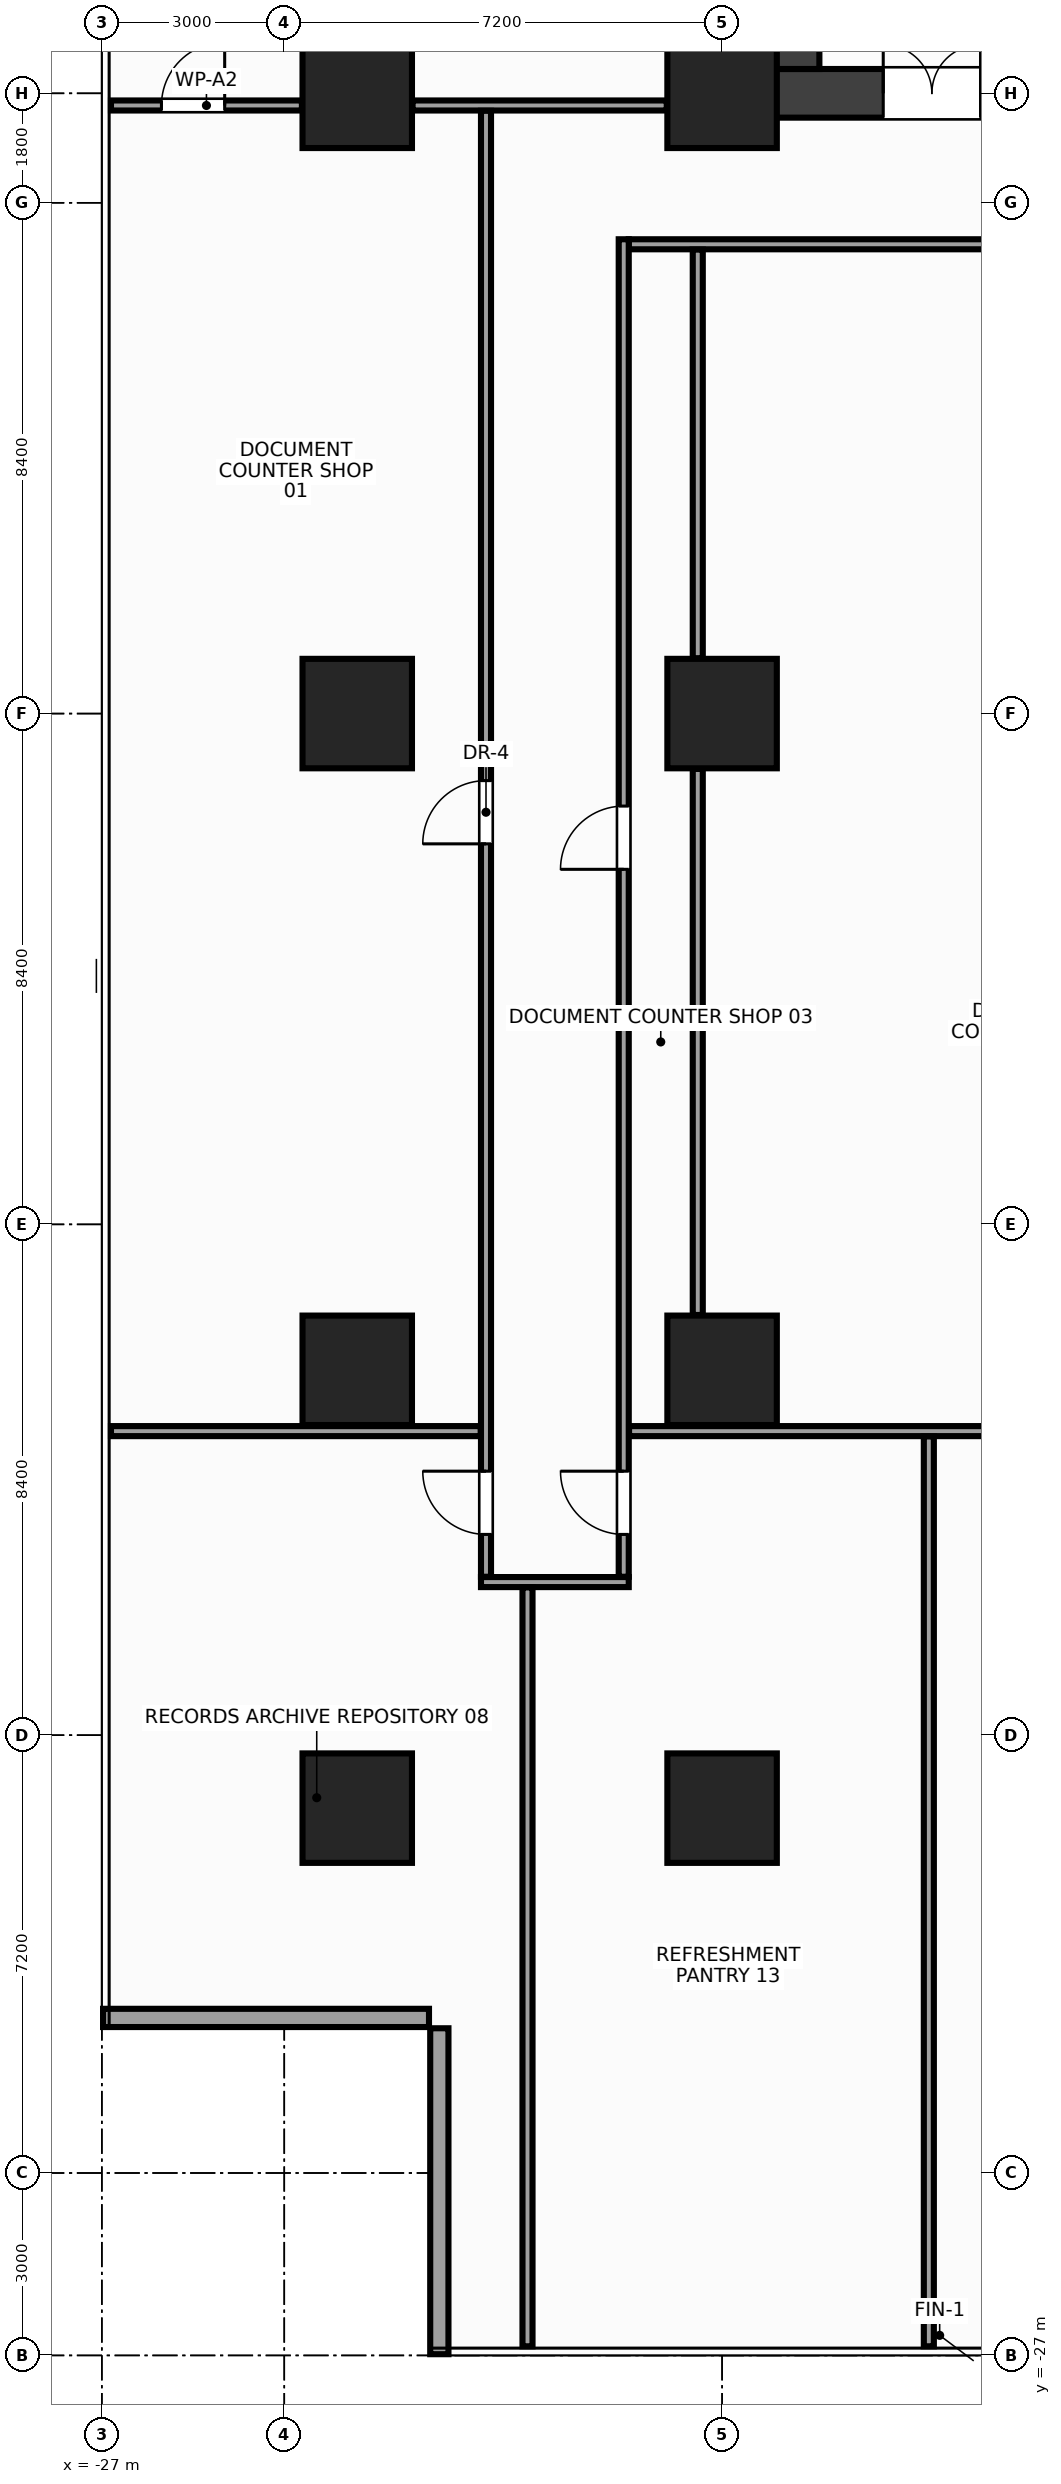
"""IFC4 building model, lengths in metres.
Left out: names, types, materials, properties, quantities, classifications, styles, units other than length and angle.
Written with IfcOpenShell. Run it as: python <this file> out.ifc"""

import sys

from ifc_helpers import new_model, si_unit, direction, frame, frame_2d, origin, origin_2d, place, context, subcontext, project, spatial, rectangle, extrude, source, transform, mapped, element, fill, save


model = new_model("IFC4")
c1 = context("Model", 3, precision=1e-05, world=origin(), true_north=direction((0.0, 1.0)))
c2 = subcontext(c1, "Body", "Model", "MODEL_VIEW")
j1 = project(units=[si_unit("LENGTHUNIT", "METRE"), si_unit("PLANEANGLEUNIT", "RADIAN")], contexts=[c1])
p1 = place(None, origin())
s1 = spatial("IfcSite", under=j1, at=p1, CompositionType="ELEMENT")
p2 = place(p1, origin())
s2 = spatial("IfcBuilding", under=s1, at=p2, CompositionType="ELEMENT")
p3 = place(p2, frame((0.0, 0.0, 59.6)))
s3 = spatial("IfcBuildingStorey", under=s2, at=p3, CompositionType="ELEMENT", Elevation=59.6)
m1 = source(origin(), c2, "Body", "SweptSolid", [
    extrude(rectangle(XDim=32.0, YDim=0.8, at=frame_2d((16.0, 0.0))), origin(), (0.0, 0.0, 1.0), 3.6),
])
p4 = place(p3, frame((-16.0, 10.2, 0.0), z_axis=(0.0, 0.0, 1.0), x_axis=(1.0, 0.0, 0.0)))
e1 = element("IfcWall", 1, at=p4, inside=s3, PredefinedType="SHEAR", context=c2, shape_type="MappedRepresentation", body=[
    mapped(m1, transform((0.0, 0.0, 0.0), x_axis=(1.0, 0.0, 0.0), y_axis=(0.0, 1.0, 0.0), z_axis=(0.0, 0.0, 1.0), scale=1.0)),
])
p5 = place(p4, frame((1.85, 0.0, 0.0)))
e2 = element("IfcOpeningElement", 2, at=p5, cuts=e1, PredefinedType="OPENING", context=c2, shape_type="SweptSolid", body=[
    extrude(rectangle(XDim=1.6, YDim=2.15, at=frame_2d((0.8, 1.075))), frame((0.0, 0.412, 0.0), z_axis=(0.0, -1.0, 0.0), x_axis=(1.0, 0.0, 0.0)), (0.0, 0.0, 1.0), 0.824),
])
p6 = place(p4, frame((28.55, 0.0, 0.0)))
e3 = element("IfcOpeningElement", 3, at=p6, cuts=e1, PredefinedType="OPENING", context=c2, shape_type="SweptSolid", body=[
    extrude(rectangle(XDim=1.6, YDim=2.15, at=frame_2d((0.8, 1.075))), frame((0.0, 0.412, 0.0), z_axis=(0.0, -1.0, 0.0), x_axis=(1.0, 0.0, 0.0)), (0.0, 0.0, 1.0), 0.824),
])
p7 = place(p4, frame((15.25, 0.0, 0.0)))
e4 = element("IfcOpeningElement", 4, at=p7, cuts=e1, PredefinedType="OPENING", context=c2, shape_type="SweptSolid", body=[
    extrude(rectangle(XDim=1.5, YDim=2.2, at=frame_2d((0.75, 1.1))), frame((0.0, 0.412, 0.0), z_axis=(0.0, -1.0, 0.0), x_axis=(1.0, 0.0, 0.0)), (0.0, 0.0, 1.0), 0.824),
])
m2 = source(origin(), c2, "Body", "SweptSolid", [
    extrude(rectangle(XDim=12.8, YDim=0.8, at=frame_2d((6.4, 0.0))), origin(), (0.0, 0.0, 1.0), 3.6),
])
p8 = place(p3, frame((-15.6, 10.6, 0.0), z_axis=(0.0, 0.0, 1.0), x_axis=(0.0, 1.0, 0.0)))
e5 = element("IfcWall", 5, at=p8, inside=s3, PredefinedType="SHEAR", context=c2, shape_type="MappedRepresentation", body=[
    mapped(m2, transform((0.0, 0.0, 0.0), x_axis=(1.0, 0.0, 0.0), y_axis=(0.0, 1.0, 0.0), z_axis=(0.0, 0.0, 1.0), scale=1.0)),
])
m3 = source(origin(), c2, "Body", "SweptSolid", [
    extrude(rectangle(XDim=1.8, YDim=1.8, at=origin_2d()), origin(), (0.0, 0.0, 1.0), 3.6),
])
for number, where, z_axis, x_axis in (
    (6, (-16.8, -18.0, 0.0), (0.0, 0.0, 1.0), (1.0, 0.0, 0.0)),
    (7, (-16.8, -10.8, 0.0), (0.0, 0.0, 1.0), (1.0, 0.0, 0.0)),
    (8, (-16.8, 0.0, 0.0), (0.0, 0.0, 1.0), (1.0, 0.0, 0.0)),
    (9, (-16.8, 10.2, 0.0), (0.0, 0.0, 1.0), (1.0, 0.0, 0.0)),
    (10, (-22.8, -18.0, 0.0), (0.0, 0.0, 1.0), (1.0, 0.0, 0.0)),
    (11, (-22.8, -10.8, 0.0), (0.0, 0.0, 1.0), (1.0, 0.0, 0.0)),
    (12, (-22.8, 0.0, 0.0), (0.0, 0.0, 1.0), (1.0, 0.0, 0.0)),
    (13, (-22.8, 10.2, 0.0), (0.0, 0.0, 1.0), (1.0, 0.0, 0.0)),
):
    element("IfcColumn", number, at=place(p3, frame(where, z_axis=z_axis, x_axis=x_axis)), inside=s3, PredefinedType="COLUMN", context=c2, shape_type="MappedRepresentation", body=[
        mapped(m3, transform((0.0, 0.0, 0.0), x_axis=(1.0, 0.0, 0.0), y_axis=(0.0, 1.0, 0.0), z_axis=(0.0, 0.0, 1.0), scale=1.0)),
    ])
m4 = source(origin(), c2, "Body", "SweptSolid", [
    extrude(rectangle(XDim=5.36, YDim=0.3, at=frame_2d((2.68, 0.0))), origin(), (0.0, 0.0, 1.0), 2.74),
])
for number, where, z_axis, x_axis in (
    (14, (-26.98, -21.45, 0.0), (0.0, 0.0, 1.0), (1.0, 0.0, 0.0)),
    (15, (-21.45, -21.62, 0.0), (0.0, 0.0, 1.0), (0.0, -1.0, 0.0)),
):
    element("IfcWall", number, at=place(p3, frame(where, z_axis=z_axis, x_axis=x_axis)), inside=s3, PredefinedType="STANDARD", context=c2, shape_type="MappedRepresentation", body=[
        mapped(m4, transform((0.0, 0.0, 0.0), x_axis=(1.0, 0.0, 0.0), y_axis=(0.0, 1.0, 0.0), z_axis=(0.0, 0.0, 1.0), scale=1.0)),
    ])
m5 = source(origin(), c2, "Body", "SweptSolid", [
    extrude(rectangle(XDim=3.14, YDim=0.165, at=frame_2d((1.57, 0.0))), origin(), (0.0, 0.0, 1.0), 2.435),
])
p9 = place(p3, frame((-26.85, 10.0, 0.0), z_axis=(0.0, 0.0, 1.0), x_axis=(1.0, 0.0, 0.0)))
e16 = element("IfcWall", 16, at=p9, inside=s3, PredefinedType="PARTITIONING", context=c2, shape_type="MappedRepresentation", body=[
    mapped(m5, transform((0.0, 0.0, 0.0), x_axis=(1.0, 0.0, 0.0), y_axis=(0.0, 1.0, 0.0), z_axis=(0.0, 0.0, 1.0), scale=1.0)),
])
p10 = place(p9, frame((0.83, 0.0, 0.0)))
e17 = element("IfcOpeningElement", 17, at=p10, cuts=e16, PredefinedType="OPENING", context=c2, shape_type="SweptSolid", body=[
    extrude(rectangle(XDim=1.04, YDim=2.2, at=frame_2d((0.52, 1.1))), frame((0.0, 0.094, 0.0), z_axis=(0.0, -1.0, 0.0), x_axis=(1.0, 0.0, 0.0)), (0.0, 0.0, 1.0), 0.189),
])
m6 = source(origin(), c2, "Body", "SweptSolid", [
    extrude(rectangle(XDim=4.18, YDim=0.165, at=frame_2d((2.09, 0.0))), origin(), (0.0, 0.0, 1.0), 2.745),
])
p11 = place(p3, frame((-21.89, 10.0, 0.0), z_axis=(0.0, 0.0, 1.0), x_axis=(1.0, 0.0, 0.0)))
e18 = element("IfcWall", 18, at=p11, inside=s3, PredefinedType="PARTITIONING", context=c2, shape_type="MappedRepresentation", body=[
    mapped(m6, transform((0.0, 0.0, 0.0), x_axis=(1.0, 0.0, 0.0), y_axis=(0.0, 1.0, 0.0), z_axis=(0.0, 0.0, 1.0), scale=1.0)),
])
m7 = source(origin(), c2, "Body", "SweptSolid", [
    extrude(rectangle(XDim=36.67, YDim=0.165, at=frame_2d((18.335, 0.0))), origin(), (0.0, 0.0, 1.0), 2.745),
])
p12 = place(p3, frame((-18.335, 7.718, 0.0), z_axis=(0.0, 0.0, 1.0), x_axis=(1.0, 0.0, 0.0)))
e19 = element("IfcWall", 19, at=p12, inside=s3, PredefinedType="PARTITIONING", context=c2, shape_type="MappedRepresentation", body=[
    mapped(m7, transform((0.0, 0.0, 0.0), x_axis=(1.0, 0.0, 0.0), y_axis=(0.0, 1.0, 0.0), z_axis=(0.0, 0.0, 1.0), scale=1.0)),
])
p13 = place(p12, frame((6.015, 0.0, 0.0)))
e20 = element("IfcOpeningElement", 20, at=p13, cuts=e19, PredefinedType="OPENING", context=c2, shape_type="SweptSolid", body=[
    extrude(rectangle(XDim=1.04, YDim=2.2, at=frame_2d((0.52, 1.1))), frame((0.0, 0.094, 0.0), z_axis=(0.0, -1.0, 0.0), x_axis=(1.0, 0.0, 0.0)), (0.0, 0.0, 1.0), 0.189),
])
p14 = place(p12, frame((29.615, 0.0, 0.0)))
e21 = element("IfcOpeningElement", 21, at=p14, cuts=e19, PredefinedType="OPENING", context=c2, shape_type="SweptSolid", body=[
    extrude(rectangle(XDim=1.04, YDim=2.2, at=frame_2d((0.52, 1.1))), frame((0.0, 0.094, 0.0), z_axis=(0.0, -1.0, 0.0), x_axis=(1.0, 0.0, 0.0)), (0.0, 0.0, 1.0), 0.189),
])
p15 = place(p12, frame((17.815, 0.0, 0.0)))
e22 = element("IfcOpeningElement", 22, at=p15, cuts=e19, PredefinedType="OPENING", context=c2, shape_type="SweptSolid", body=[
    extrude(rectangle(XDim=1.04, YDim=2.2, at=frame_2d((0.52, 1.1))), frame((0.0, 0.094, 0.0), z_axis=(0.0, -1.0, 0.0), x_axis=(1.0, 0.0, 0.0)), (0.0, 0.0, 1.0), 0.189),
])
m8 = source(origin(), c2, "Body", "SweptSolid", [
    extrude(rectangle(XDim=2.43, YDim=0.165, at=frame_2d((1.215, 0.0))), origin(), (0.0, 0.0, 1.0), 2.745),
])
p16 = place(p3, frame((-20.765, -14.282, 0.0), z_axis=(0.0, 0.0, 1.0), x_axis=(1.0, 0.0, 0.0)))
e23 = element("IfcWall", 23, at=p16, inside=s3, PredefinedType="PARTITIONING", context=c2, shape_type="MappedRepresentation", body=[
    mapped(m8, transform((0.0, 0.0, 0.0), x_axis=(1.0, 0.0, 0.0), y_axis=(0.0, 1.0, 0.0), z_axis=(0.0, 0.0, 1.0), scale=1.0)),
])
m9 = source(origin(), c2, "Body", "SweptSolid", [
    extrude(rectangle(XDim=24.108, YDim=0.165, at=frame_2d((12.054, 0.0))), origin(), (0.0, 0.0, 1.0), 2.745),
])
p17 = place(p3, frame((-20.683, -14.195, 0.0), z_axis=(0.0, 0.0, 1.0), x_axis=(0.0, 1.0, 0.0)))
e24 = element("IfcWall", 24, at=p17, inside=s3, PredefinedType="PARTITIONING", context=c2, shape_type="MappedRepresentation", body=[
    mapped(m9, transform((0.0, 0.0, 0.0), x_axis=(1.0, 0.0, 0.0), y_axis=(0.0, 1.0, 0.0), z_axis=(0.0, 0.0, 1.0), scale=1.0)),
])
p18 = place(p17, frame((12.052, 0.0, 0.0)))
e25 = element("IfcOpeningElement", 25, at=p18, cuts=e24, PredefinedType="OPENING", context=c2, shape_type="SweptSolid", body=[
    extrude(rectangle(XDim=1.04, YDim=2.2, at=frame_2d((0.52, 1.1))), frame((0.0, 0.094, 0.0), z_axis=(0.0, -1.0, 0.0), x_axis=(1.0, 0.0, 0.0)), (0.0, 0.0, 1.0), 0.189),
])
p19 = place(p17, frame((0.696, 0.0, 0.0)))
e26 = element("IfcOpeningElement", 26, at=p19, cuts=e24, PredefinedType="OPENING", context=c2, shape_type="SweptSolid", body=[
    extrude(rectangle(XDim=1.04, YDim=2.2, at=frame_2d((0.52, 1.1))), frame((0.0, 0.094, 0.0), z_axis=(0.0, -1.0, 0.0), x_axis=(1.0, 0.0, 0.0)), (0.0, 0.0, 1.0), 0.189),
])
m10 = source(origin(), c2, "Body", "SweptSolid", [
    extrude(rectangle(XDim=21.995, YDim=0.165, at=frame_2d((10.998, 0.0))), origin(), (0.0, 0.0, 1.0), 2.745),
])
p20 = place(p3, frame((-18.417, -14.195, 0.0), z_axis=(0.0, 0.0, 1.0), x_axis=(0.0, 1.0, 0.0)))
e27 = element("IfcWall", 27, at=p20, inside=s3, PredefinedType="PARTITIONING", context=c2, shape_type="MappedRepresentation", body=[
    mapped(m10, transform((0.0, 0.0, 0.0), x_axis=(1.0, 0.0, 0.0), y_axis=(0.0, 1.0, 0.0), z_axis=(0.0, 0.0, 1.0), scale=1.0)),
])
p21 = place(p20, frame((11.634, 0.0, 0.0)))
e28 = element("IfcOpeningElement", 28, at=p21, cuts=e27, PredefinedType="OPENING", context=c2, shape_type="SweptSolid", body=[
    extrude(rectangle(XDim=1.04, YDim=2.2, at=frame_2d((0.52, 1.1))), frame((0.0, 0.094, 0.0), z_axis=(0.0, -1.0, 0.0), x_axis=(1.0, 0.0, 0.0)), (0.0, 0.0, 1.0), 0.189),
])
p22 = place(p20, frame((0.696, 0.0, 0.0)))
e29 = element("IfcOpeningElement", 29, at=p22, cuts=e27, PredefinedType="OPENING", context=c2, shape_type="SweptSolid", body=[
    extrude(rectangle(XDim=1.04, YDim=2.2, at=frame_2d((0.52, 1.1))), frame((0.0, 0.094, 0.0), z_axis=(0.0, -1.0, 0.0), x_axis=(1.0, 0.0, 0.0)), (0.0, 0.0, 1.0), 0.189),
])
m11 = source(origin(), c2, "Body", "SweptSolid", [
    extrude(rectangle(XDim=6.08, YDim=0.165, at=frame_2d((3.04, 0.0))), origin(), (0.0, 0.0, 1.0), 2.945),
])
p23 = place(p3, frame((-26.85, -11.8, 0.0), z_axis=(0.0, 0.0, 1.0), x_axis=(1.0, 0.0, 0.0)))
e30 = element("IfcWall", 30, at=p23, inside=s3, PredefinedType="PARTITIONING", context=c2, shape_type="MappedRepresentation", body=[
    mapped(m11, transform((0.0, 0.0, 0.0), x_axis=(1.0, 0.0, 0.0), y_axis=(0.0, 1.0, 0.0), z_axis=(0.0, 0.0, 1.0), scale=1.0)),
])
m12 = source(origin(), c2, "Body", "SweptSolid", [
    extrude(rectangle(XDim=36.66, YDim=0.165, at=frame_2d((18.33, 0.0))), origin(), (0.0, 0.0, 1.0), 2.945),
])
p24 = place(p3, frame((-18.33, -11.8, 0.0), z_axis=(0.0, 0.0, 1.0), x_axis=(1.0, 0.0, 0.0)))
e31 = element("IfcWall", 31, at=p24, inside=s3, PredefinedType="PARTITIONING", context=c2, shape_type="MappedRepresentation", body=[
    mapped(m12, transform((0.0, 0.0, 0.0), x_axis=(1.0, 0.0, 0.0), y_axis=(0.0, 1.0, 0.0), z_axis=(0.0, 0.0, 1.0), scale=1.0)),
])
p25 = place(p24, frame((7.47, 0.0, 0.0)))
e32 = element("IfcOpeningElement", 32, at=p25, cuts=e31, PredefinedType="OPENING", context=c2, shape_type="SweptSolid", body=[
    extrude(rectangle(XDim=1.04, YDim=2.2, at=frame_2d((0.52, 1.1))), frame((0.0, 0.094, 0.0), z_axis=(0.0, -1.0, 0.0), x_axis=(1.0, 0.0, 0.0)), (0.0, 0.0, 1.0), 0.189),
])
p26 = place(p24, frame((15.83, 0.0, 0.0)))
e33 = element("IfcOpeningElement", 33, at=p26, cuts=e31, PredefinedType="OPENING", context=c2, shape_type="SweptSolid", body=[
    extrude(rectangle(XDim=1.04, YDim=2.2, at=frame_2d((0.52, 1.1))), frame((0.0, 0.094, 0.0), z_axis=(0.0, -1.0, 0.0), x_axis=(1.0, 0.0, 0.0)), (0.0, 0.0, 1.0), 0.189),
])
p27 = place(p24, frame((28.15, 0.0, 0.0)))
e34 = element("IfcOpeningElement", 34, at=p27, cuts=e31, PredefinedType="OPENING", context=c2, shape_type="SweptSolid", body=[
    extrude(rectangle(XDim=1.04, YDim=2.2, at=frame_2d((0.52, 1.1))), frame((0.0, 0.094, 0.0), z_axis=(0.0, -1.0, 0.0), x_axis=(1.0, 0.0, 0.0)), (0.0, 0.0, 1.0), 0.189),
])
m13 = source(origin(), c2, "Body", "SweptSolid", [
    extrude(rectangle(XDim=8.98, YDim=0.165, at=frame_2d((4.49, 0.0))), origin(), (0.0, 0.0, 1.0), 3.36),
])
p28 = place(p3, frame((-17.2, -9.89, 0.0), z_axis=(0.0, 0.0, 1.0), x_axis=(0.0, 1.0, 0.0)))
e35 = element("IfcWall", 35, at=p28, inside=s3, PredefinedType="PARTITIONING", context=c2, shape_type="MappedRepresentation", body=[
    mapped(m13, transform((0.0, 0.0, 0.0), x_axis=(1.0, 0.0, 0.0), y_axis=(0.0, 1.0, 0.0), z_axis=(0.0, 0.0, 1.0), scale=1.0)),
])
m14 = source(origin(), c2, "Body", "SweptSolid", [
    extrude(rectangle(XDim=6.72, YDim=0.165, at=frame_2d((3.36, 0.0))), origin(), (0.0, 0.0, 1.0), 3.36),
])
p29 = place(p3, frame((-17.2, 0.91, 0.0), z_axis=(0.0, 0.0, 1.0), x_axis=(0.0, 1.0, 0.0)))
e36 = element("IfcWall", 36, at=p29, inside=s3, PredefinedType="PARTITIONING", context=c2, shape_type="MappedRepresentation", body=[
    mapped(m14, transform((0.0, 0.0, 0.0), x_axis=(1.0, 0.0, 0.0), y_axis=(0.0, 1.0, 0.0), z_axis=(0.0, 0.0, 1.0), scale=1.0)),
])
m15 = source(origin(), c2, "Body", "SweptSolid", [
    extrude(rectangle(XDim=12.48, YDim=0.165, at=frame_2d((6.24, 0.0))), origin(), (0.0, 0.0, 1.0), 2.745),
])
p30 = place(p3, frame((-20.0, -26.85, 0.0), z_axis=(0.0, 0.0, 1.0), x_axis=(0.0, 1.0, 0.0)))
e37 = element("IfcWall", 37, at=p30, inside=s3, PredefinedType="PARTITIONING", context=c2, shape_type="MappedRepresentation", body=[
    mapped(m15, transform((0.0, 0.0, 0.0), x_axis=(1.0, 0.0, 0.0), y_axis=(0.0, 1.0, 0.0), z_axis=(0.0, 0.0, 1.0), scale=1.0)),
])
m16 = source(origin(), c2, "Body", "SweptSolid", [
    extrude(rectangle(XDim=14.963, YDim=0.165, at=frame_2d((7.481, 0.0))), origin(), (0.0, 0.0, 1.0), 2.745),
])
p31 = place(p3, frame((-13.4, -26.85, 0.0), z_axis=(0.0, 0.0, 1.0), x_axis=(0.0, 1.0, 0.0)))
e38 = element("IfcWall", 38, at=p31, inside=s3, PredefinedType="PARTITIONING", context=c2, shape_type="MappedRepresentation", body=[
    mapped(m16, transform((0.0, 0.0, 0.0), x_axis=(1.0, 0.0, 0.0), y_axis=(0.0, 1.0, 0.0), z_axis=(0.0, 0.0, 1.0), scale=1.0)),
])
m17 = source(origin(), c2, "Body", "SweptSolid", [
    extrude(rectangle(XDim=1.6, YDim=2.15, at=frame_2d((0.8, 1.075))), frame((0.0, 0.025, 0.0), z_axis=(0.0, -1.0, 0.0), x_axis=(1.0, 0.0, 0.0)), (0.0, 0.0, 1.0), 0.05),
])
p32 = place(p5, origin())
e39 = element("IfcDoor", 39, at=p32, inside=s3, OperationType="DOUBLE_DOOR_SINGLE_SWING", PredefinedType="DOOR", context=c2, shape_type="MappedRepresentation", body=[
    mapped(m17, transform((0.0, 0.0, 0.0), x_axis=(1.0, 0.0, 0.0), y_axis=(0.0, 1.0, 0.0), z_axis=(0.0, 0.0, 1.0), scale=1.0)),
])
fill(e2, e39)
m18 = source(origin(), c2, "Body", "SweptSolid", [
    extrude(rectangle(XDim=1.04, YDim=2.2, at=frame_2d((0.52, 1.1))), frame((0.0, 0.025, 0.0), z_axis=(0.0, -1.0, 0.0), x_axis=(1.0, 0.0, 0.0)), (0.0, 0.0, 1.0), 0.05),
])
p33 = place(p18, origin())
e40 = element("IfcDoor", 40, at=p33, inside=s3, OperationType="SINGLE_SWING_LEFT", PredefinedType="DOOR", context=c2, shape_type="MappedRepresentation", body=[
    mapped(m18, transform((0.0, 0.0, 0.0), x_axis=(1.0, 0.0, 0.0), y_axis=(0.0, 1.0, 0.0), z_axis=(0.0, 0.0, 1.0), scale=1.0)),
])
fill(e25, e40)
p34 = place(p21, origin())
e41 = element("IfcDoor", 41, at=p34, inside=s3, OperationType="SINGLE_SWING_LEFT", PredefinedType="DOOR", context=c2, shape_type="MappedRepresentation", body=[
    mapped(m18, transform((0.0, 0.0, 0.0), x_axis=(1.0, 0.0, 0.0), y_axis=(0.0, 1.0, 0.0), z_axis=(0.0, 0.0, 1.0), scale=1.0)),
])
fill(e28, e41)
p35 = place(p19, origin())
e42 = element("IfcDoor", 42, at=p35, inside=s3, OperationType="SINGLE_SWING_RIGHT", PredefinedType="DOOR", context=c2, shape_type="MappedRepresentation", body=[
    mapped(m18, transform((0.0, 0.0, 0.0), x_axis=(1.0, 0.0, 0.0), y_axis=(0.0, 1.0, 0.0), z_axis=(0.0, 0.0, 1.0), scale=1.0)),
])
fill(e26, e42)
p36 = place(p22, origin())
e43 = element("IfcDoor", 43, at=p36, inside=s3, OperationType="SINGLE_SWING_RIGHT", PredefinedType="DOOR", context=c2, shape_type="MappedRepresentation", body=[
    mapped(m18, transform((0.0, 0.0, 0.0), x_axis=(1.0, 0.0, 0.0), y_axis=(0.0, 1.0, 0.0), z_axis=(0.0, 0.0, 1.0), scale=1.0)),
])
fill(e29, e43)
p37 = place(p10, origin())
e44 = element("IfcDoor", 44, at=p37, inside=s3, OperationType="SINGLE_SWING_RIGHT", PredefinedType="DOOR", context=c2, shape_type="MappedRepresentation", body=[
    mapped(m18, transform((0.0, 0.0, 0.0), x_axis=(1.0, 0.0, 0.0), y_axis=(0.0, 1.0, 0.0), z_axis=(0.0, 0.0, 1.0), scale=1.0)),
])
fill(e17, e44)
save(model, sys.argv[1])
